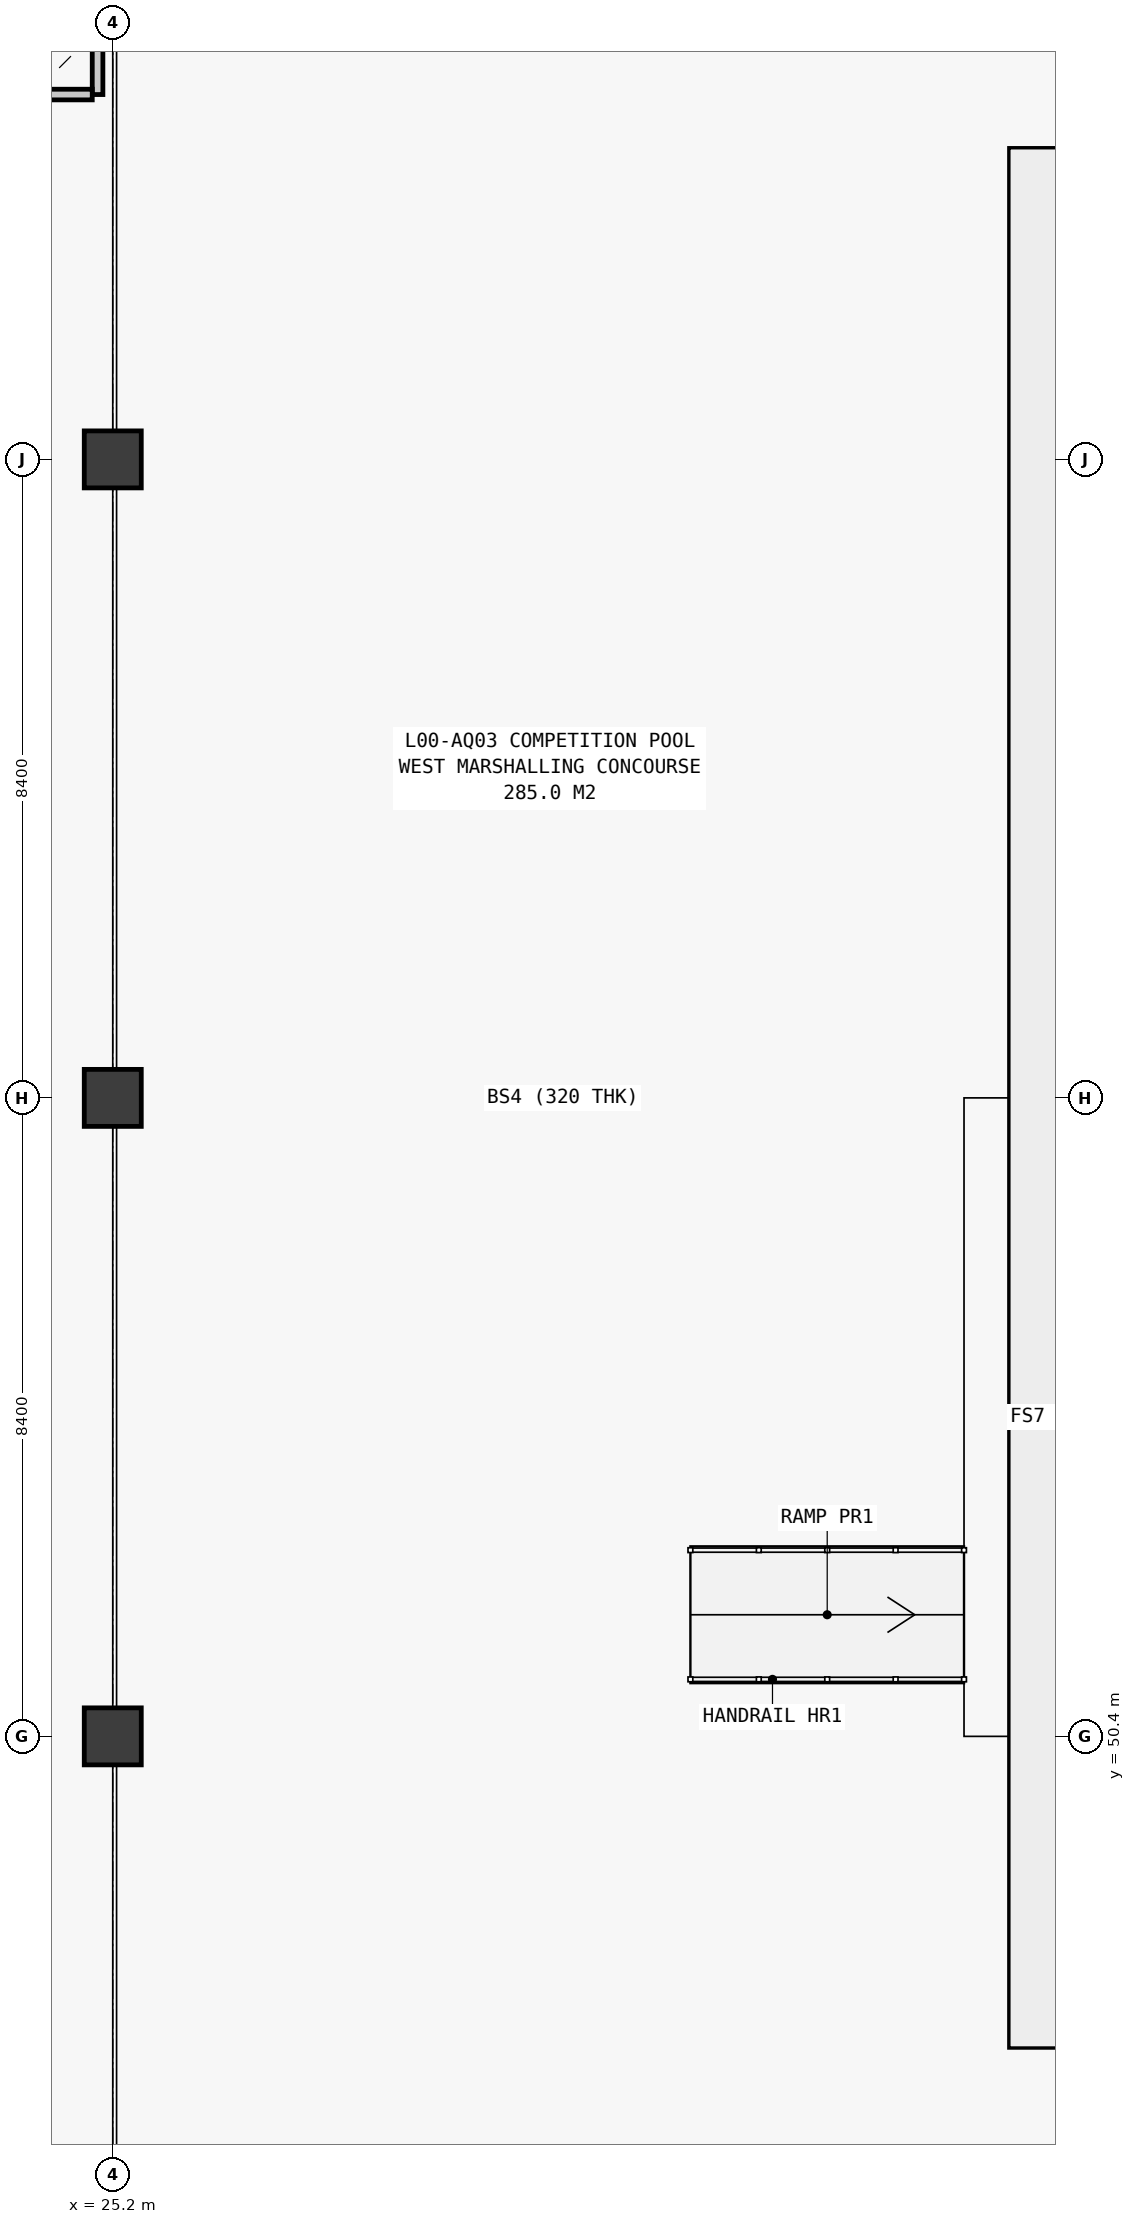
"""IFC4 building model, lengths in metres.
Left out: names, types, materials, properties, quantities, classifications, styles, units other than length and angle.
Written with IfcOpenShell. Run it as: python <this file> out.ifc"""

import sys

from ifc_helpers import new_model, si_unit, direction, frame, frame_2d, origin, origin_2d, place, context, subcontext, project, spatial, rectangle, extrude, element, save


model = new_model("IFC4")
c1 = context("Model", 3, precision=1e-05, world=origin(), true_north=direction((0.0, 1.0)))
c2 = subcontext(c1, "Body", "Model", "MODEL_VIEW")
j1 = project(units=[si_unit("LENGTHUNIT", "METRE"), si_unit("PLANEANGLEUNIT", "RADIAN")], contexts=[c1])
p1 = place(None, origin())
s1 = spatial("IfcSite", under=j1, at=p1, CompositionType="ELEMENT")
p2 = place(p1, origin())
s2 = spatial("IfcBuilding", under=s1, at=p2, CompositionType="ELEMENT")
p3 = place(p2, origin())
s3 = spatial("IfcBuildingStorey", under=s2, at=p3, CompositionType="ELEMENT", Elevation=0.0)
for number, where, z_axis, x_axis in (
    (1, (25.2, 50.4, 0.0), (0.0, 0.0, 1.0), (1.0, 0.0, 0.0)),
    (2, (25.2, 58.8, 0.0), (0.0, 0.0, 1.0), (1.0, 0.0, 0.0)),
    (3, (25.2, 67.2, 0.0), (0.0, 0.0, 1.0), (1.0, 0.0, 0.0)),
):
    element("IfcColumn", number, at=place(p3, frame(where, z_axis=z_axis, x_axis=x_axis)), inside=s3, PredefinedType="COLUMN", context=c2, shape_type="SweptSolid", body=[
        extrude(rectangle(XDim=0.75, YDim=0.75, at=origin_2d()), origin(), (0.0, 0.0, 1.0), 4.8),
    ])
p4 = place(p3, frame((25.0, 72.0, 0.0), z_axis=(0.0, 0.0, 1.0), x_axis=(0.0, 1.0, 0.0)))
e4 = element("IfcWall", 4, at=p4, inside=s3, PredefinedType="PARTITIONING", context=c2, shape_type="SweptSolid", body=[
    extrude(rectangle(XDim=11.84, YDim=0.14, at=frame_2d((5.92, 0.0))), origin(), (0.0, 0.0, 1.0), 4.52),
])
p5 = place(p3, frame((16.87, 72.0, 0.0), z_axis=(0.0, 0.0, 1.0), x_axis=(1.0, 0.0, 0.0)))
e5 = element("IfcWall", 5, at=p5, inside=s3, PredefinedType="PARTITIONING", context=c2, shape_type="SweptSolid", body=[
    extrude(rectangle(XDim=8.06, YDim=0.14, at=frame_2d((4.03, 0.0))), origin(), (0.0, 0.0, 1.0), 4.52),
])
save(model, sys.argv[1])
